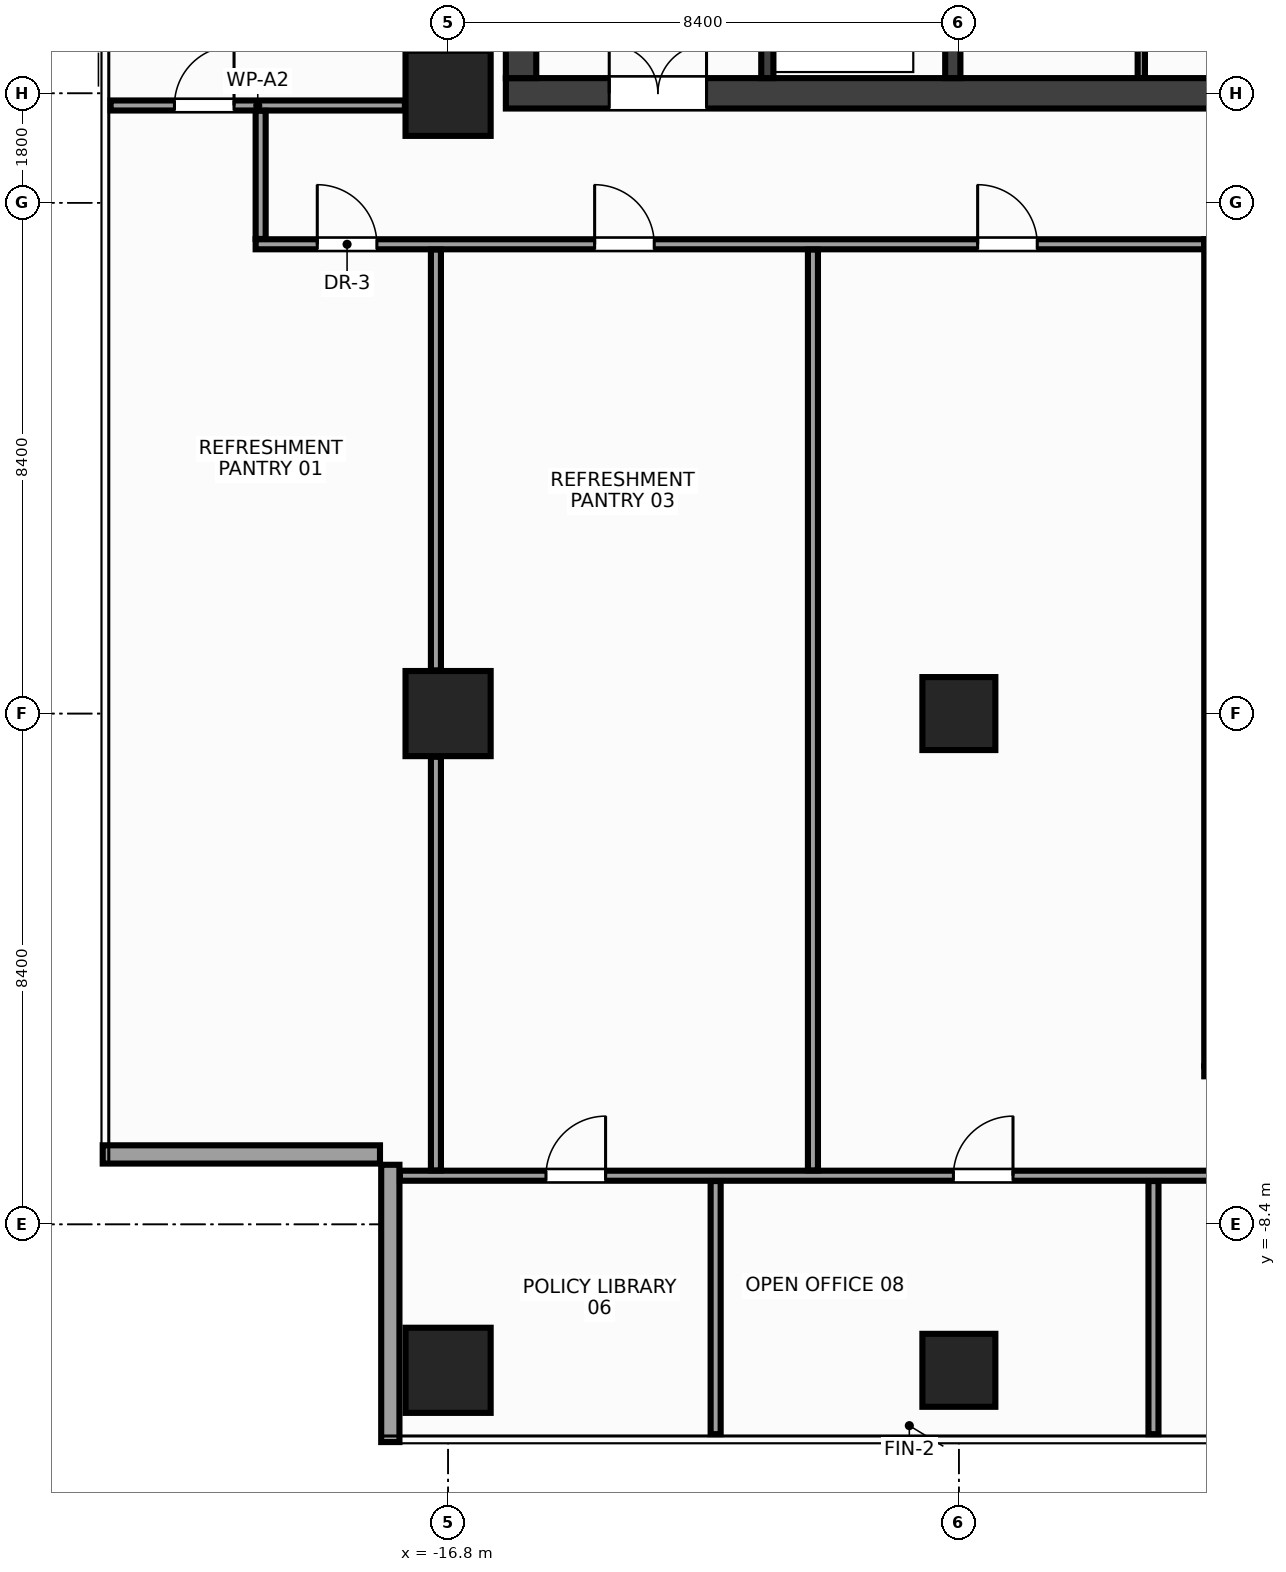
"""IFC4 building model, lengths in metres.
Left out: names, types, materials, properties, quantities, classifications, styles, units other than length and angle.
Written with IfcOpenShell. Run it as: python <this file> out.ifc"""

import sys

from ifc_helpers import new_model, si_unit, direction, frame, frame_2d, origin, origin_2d, place, context, subcontext, project, spatial, rectangle, extrude, source, transform, mapped, element, fill, save


model = new_model("IFC4")
c1 = context("Model", 3, precision=1e-05, world=origin(), true_north=direction((0.0, 1.0)))
c2 = subcontext(c1, "Body", "Model", "MODEL_VIEW")
j1 = project(units=[si_unit("LENGTHUNIT", "METRE"), si_unit("PLANEANGLEUNIT", "RADIAN")], contexts=[c1])
p1 = place(None, origin())
s1 = spatial("IfcSite", under=j1, at=p1, CompositionType="ELEMENT")
p2 = place(p1, origin())
s2 = spatial("IfcBuilding", under=s1, at=p2, CompositionType="ELEMENT")
p3 = place(p2, frame((0.0, 0.0, 257.6)))
s3 = spatial("IfcBuildingStorey", under=s2, at=p3, CompositionType="ELEMENT", Elevation=257.6)
m1 = source(origin(), c2, "Body", "SweptSolid", [
    extrude(rectangle(XDim=31.7, YDim=0.5, at=frame_2d((15.85, 0.0))), origin(), (0.0, 0.0, 1.0), 3.6),
])
p4 = place(p3, frame((-15.85, 10.2, 0.0), z_axis=(0.0, 0.0, 1.0), x_axis=(1.0, 0.0, 0.0)))
e1 = element("IfcWall", 1, at=p4, inside=s3, PredefinedType="SHEAR", context=c2, shape_type="MappedRepresentation", body=[
    mapped(m1, transform((0.0, 0.0, 0.0), x_axis=(1.0, 0.0, 0.0), y_axis=(0.0, 1.0, 0.0), z_axis=(0.0, 0.0, 1.0), scale=1.0)),
])
p5 = place(p4, frame((1.7, 0.0, 0.0)))
e2 = element("IfcOpeningElement", 2, at=p5, cuts=e1, PredefinedType="OPENING", context=c2, shape_type="SweptSolid", body=[
    extrude(rectangle(XDim=1.6, YDim=2.15, at=frame_2d((0.8, 1.075))), frame((0.0, 0.262, 0.0), z_axis=(0.0, -1.0, 0.0), x_axis=(1.0, 0.0, 0.0)), (0.0, 0.0, 1.0), 0.524),
])
p6 = place(p4, frame((28.4, 0.0, 0.0)))
e3 = element("IfcOpeningElement", 3, at=p6, cuts=e1, PredefinedType="OPENING", context=c2, shape_type="SweptSolid", body=[
    extrude(rectangle(XDim=1.6, YDim=2.15, at=frame_2d((0.8, 1.075))), frame((0.0, 0.262, 0.0), z_axis=(0.0, -1.0, 0.0), x_axis=(1.0, 0.0, 0.0)), (0.0, 0.0, 1.0), 0.524),
])
p7 = place(p4, frame((15.1, 0.0, 0.0)))
e4 = element("IfcOpeningElement", 4, at=p7, cuts=e1, PredefinedType="OPENING", context=c2, shape_type="SweptSolid", body=[
    extrude(rectangle(XDim=1.5, YDim=2.2, at=frame_2d((0.75, 1.1))), frame((0.0, 0.262, 0.0), z_axis=(0.0, -1.0, 0.0), x_axis=(1.0, 0.0, 0.0)), (0.0, 0.0, 1.0), 0.524),
])
m2 = source(origin(), c2, "Body", "SweptSolid", [
    extrude(rectangle(XDim=13.1, YDim=0.5, at=frame_2d((6.55, 0.0))), origin(), (0.0, 0.0, 1.0), 3.6),
])
p8 = place(p3, frame((-15.6, 10.45, 0.0), z_axis=(0.0, 0.0, 1.0), x_axis=(0.0, 1.0, 0.0)))
e5 = element("IfcWall", 5, at=p8, inside=s3, PredefinedType="SHEAR", context=c2, shape_type="MappedRepresentation", body=[
    mapped(m2, transform((0.0, 0.0, 0.0), x_axis=(1.0, 0.0, 0.0), y_axis=(0.0, 1.0, 0.0), z_axis=(0.0, 0.0, 1.0), scale=1.0)),
])
m3 = source(origin(), c2, "Body", "SweptSolid", [
    extrude(rectangle(XDim=13.1, YDim=0.25, at=frame_2d((6.55, 0.0))), origin(), (0.0, 0.0, 1.0), 3.6),
])
p9 = place(p3, frame((-8.5, 10.45, 0.0), z_axis=(0.0, 0.0, 1.0), x_axis=(0.0, 1.0, 0.0)))
e6 = element("IfcWall", 6, at=p9, inside=s3, PredefinedType="SHEAR", context=c2, shape_type="MappedRepresentation", body=[
    mapped(m3, transform((0.0, 0.0, 0.0), x_axis=(1.0, 0.0, 0.0), y_axis=(0.0, 1.0, 0.0), z_axis=(0.0, 0.0, 1.0), scale=1.0)),
])
p10 = place(p9, frame((4.22, 0.0, 0.0)))
e7 = element("IfcOpeningElement", 7, at=p10, cuts=e6, PredefinedType="OPENING", context=c2, shape_type="SweptSolid", body=[
    extrude(rectangle(XDim=1.1, YDim=2.15, at=frame_2d((0.55, 1.075))), frame((0.0, 0.137, 0.0), z_axis=(0.0, -1.0, 0.0), x_axis=(1.0, 0.0, 0.0)), (0.0, 0.0, 1.0), 0.274),
])
p11 = place(p9, frame((6.14, 0.0, 0.0)))
e8 = element("IfcOpeningElement", 8, at=p11, cuts=e6, PredefinedType="OPENING", context=c2, shape_type="SweptSolid", body=[
    extrude(rectangle(XDim=1.1, YDim=2.15, at=frame_2d((0.55, 1.075))), frame((0.0, 0.137, 0.0), z_axis=(0.0, -1.0, 0.0), x_axis=(1.0, 0.0, 0.0)), (0.0, 0.0, 1.0), 0.274),
])
p12 = place(p9, frame((8.06, 0.0, 0.0)))
e9 = element("IfcOpeningElement", 9, at=p12, cuts=e6, PredefinedType="OPENING", context=c2, shape_type="SweptSolid", body=[
    extrude(rectangle(XDim=1.1, YDim=2.15, at=frame_2d((0.55, 1.075))), frame((0.0, 0.137, 0.0), z_axis=(0.0, -1.0, 0.0), x_axis=(1.0, 0.0, 0.0)), (0.0, 0.0, 1.0), 0.274),
])
m4 = source(origin(), c2, "Body", "SweptSolid", [
    extrude(rectangle(XDim=3.2, YDim=0.2, at=frame_2d((1.6, 0.0))), origin(), (0.0, 0.0, 1.0), 3.6),
])
p13 = place(p3, frame((-11.55, 10.45, 0.0), z_axis=(0.0, 0.0, 1.0), x_axis=(0.0, 1.0, 0.0)))
e10 = element("IfcWall", 10, at=p13, inside=s3, PredefinedType="SHEAR", context=c2, shape_type="MappedRepresentation", body=[
    mapped(m4, transform((0.0, 0.0, 0.0), x_axis=(1.0, 0.0, 0.0), y_axis=(0.0, 1.0, 0.0), z_axis=(0.0, 0.0, 1.0), scale=1.0)),
])
p14 = place(p13, frame((0.9, 0.0, 0.0)))
e11 = element("IfcOpeningElement", 11, at=p14, cuts=e10, PredefinedType="OPENING", context=c2, shape_type="SweptSolid", body=[
    extrude(rectangle(XDim=1.1, YDim=2.15, at=frame_2d((0.55, 1.075))), frame((0.0, 0.112, 0.0), z_axis=(0.0, -1.0, 0.0), x_axis=(1.0, 0.0, 0.0)), (0.0, 0.0, 1.0), 0.224),
])
m5 = source(origin(), c2, "Body", "SweptSolid", [
    extrude(rectangle(XDim=1.4, YDim=1.4, at=origin_2d()), origin(), (0.0, 0.0, 1.0), 3.6),
])
for number, where, z_axis, x_axis in (
    (12, (-16.8, -10.8, 0.0), (0.0, 0.0, 1.0), (1.0, 0.0, 0.0)),
    (13, (-16.8, 0.0, 0.0), (0.0, 0.0, 1.0), (1.0, 0.0, 0.0)),
    (14, (-16.8, 10.2, 0.0), (0.0, 0.0, 1.0), (1.0, 0.0, 0.0)),
):
    element("IfcColumn", number, at=place(p3, frame(where, z_axis=z_axis, x_axis=x_axis)), inside=s3, PredefinedType="COLUMN", context=c2, shape_type="MappedRepresentation", body=[
        mapped(m5, transform((0.0, 0.0, 0.0), x_axis=(1.0, 0.0, 0.0), y_axis=(0.0, 1.0, 0.0), z_axis=(0.0, 0.0, 1.0), scale=1.0)),
    ])
m6 = source(origin(), c2, "Body", "SweptSolid", [
    extrude(rectangle(XDim=1.2, YDim=1.2, at=origin_2d()), origin(), (0.0, 0.0, 1.0), 3.6),
])
for number, where, z_axis, x_axis in (
    (15, (-8.4, 0.0, 0.0), (0.0, 0.0, 1.0), (1.0, 0.0, 0.0)),
    (16, (-8.4, -10.8, 0.0), (0.0, 0.0, 1.0), (1.0, 0.0, 0.0)),
):
    element("IfcColumn", number, at=place(p3, frame(where, z_axis=z_axis, x_axis=x_axis)), inside=s3, PredefinedType="COLUMN", context=c2, shape_type="MappedRepresentation", body=[
        mapped(m6, transform((0.0, 0.0, 0.0), x_axis=(1.0, 0.0, 0.0), y_axis=(0.0, 1.0, 0.0), z_axis=(0.0, 0.0, 1.0), scale=1.0)),
    ])
m7 = source(origin(), c2, "Body", "SweptSolid", [
    extrude(rectangle(XDim=4.56, YDim=0.3, at=frame_2d((2.28, 0.0))), origin(), (0.0, 0.0, 1.0), 2.75),
])
for number, where, z_axis, x_axis in (
    (17, (-22.48, -7.25, 0.0), (0.0, 0.0, 1.0), (1.0, 0.0, 0.0)),
    (18, (-17.75, -7.42, 0.0), (0.0, 0.0, 1.0), (0.0, -1.0, 0.0)),
):
    element("IfcWall", number, at=place(p3, frame(where, z_axis=z_axis, x_axis=x_axis)), inside=s3, PredefinedType="STANDARD", context=c2, shape_type="MappedRepresentation", body=[
        mapped(m7, transform((0.0, 0.0, 0.0), x_axis=(1.0, 0.0, 0.0), y_axis=(0.0, 1.0, 0.0), z_axis=(0.0, 0.0, 1.0), scale=1.0)),
    ])
m8 = source(origin(), c2, "Body", "SweptSolid", [
    extrude(rectangle(XDim=3.49, YDim=0.12, at=frame_2d((1.745, 0.0))), origin(), (0.0, 0.0, 1.0), 3.37),
])
p15 = place(p3, frame((-5.4, 10.45, 0.0), z_axis=(0.0, 0.0, 1.0), x_axis=(0.0, 1.0, 0.0)))
e19 = element("IfcWall", 19, at=p15, inside=s3, PredefinedType="PARTITIONING", context=c2, shape_type="MappedRepresentation", body=[
    mapped(m8, transform((0.0, 0.0, 0.0), x_axis=(1.0, 0.0, 0.0), y_axis=(0.0, 1.0, 0.0), z_axis=(0.0, 0.0, 1.0), scale=1.0)),
])
m9 = source(origin(), c2, "Body", "SweptSolid", [
    extrude(rectangle(XDim=4.84, YDim=0.165, at=frame_2d((2.42, 0.0))), origin(), (0.0, 0.0, 1.0), 3.37),
])
p16 = place(p3, frame((-22.35, 10.0, 0.0), z_axis=(0.0, 0.0, 1.0), x_axis=(1.0, 0.0, 0.0)))
e20 = element("IfcWall", 20, at=p16, inside=s3, PredefinedType="PARTITIONING", context=c2, shape_type="MappedRepresentation", body=[
    mapped(m9, transform((0.0, 0.0, 0.0), x_axis=(1.0, 0.0, 0.0), y_axis=(0.0, 1.0, 0.0), z_axis=(0.0, 0.0, 1.0), scale=1.0)),
])
p17 = place(p16, frame((1.05, 0.0, 0.0)))
e21 = element("IfcOpeningElement", 21, at=p17, cuts=e20, PredefinedType="OPENING", context=c2, shape_type="SweptSolid", body=[
    extrude(rectangle(XDim=0.98, YDim=2.15, at=frame_2d((0.49, 1.075))), frame((0.0, 0.094, 0.0), z_axis=(0.0, -1.0, 0.0), x_axis=(1.0, 0.0, 0.0)), (0.0, 0.0, 1.0), 0.189),
])
m10 = source(origin(), c2, "Body", "SweptSolid", [
    extrude(rectangle(XDim=15.6, YDim=0.165, at=frame_2d((7.8, 0.0))), origin(), (0.0, 0.0, 1.0), 2.755),
])
p18 = place(p3, frame((-19.965, 7.718, 0.0), z_axis=(0.0, 0.0, 1.0), x_axis=(1.0, 0.0, 0.0)))
e22 = element("IfcWall", 22, at=p18, inside=s3, PredefinedType="PARTITIONING", context=c2, shape_type="MappedRepresentation", body=[
    mapped(m10, transform((0.0, 0.0, 0.0), x_axis=(1.0, 0.0, 0.0), y_axis=(0.0, 1.0, 0.0), z_axis=(0.0, 0.0, 1.0), scale=1.0)),
])
p19 = place(p18, frame((1.014, 0.0, 0.0)))
e23 = element("IfcOpeningElement", 23, at=p19, cuts=e22, PredefinedType="OPENING", context=c2, shape_type="SweptSolid", body=[
    extrude(rectangle(XDim=0.98, YDim=2.15, at=frame_2d((0.49, 1.075))), frame((0.0, 0.094, 0.0), z_axis=(0.0, -1.0, 0.0), x_axis=(1.0, 0.0, 0.0)), (0.0, 0.0, 1.0), 0.189),
])
p20 = place(p18, frame((5.575, 0.0, 0.0)))
e24 = element("IfcOpeningElement", 24, at=p20, cuts=e22, PredefinedType="OPENING", context=c2, shape_type="SweptSolid", body=[
    extrude(rectangle(XDim=0.98, YDim=2.15, at=frame_2d((0.49, 1.075))), frame((0.0, 0.094, 0.0), z_axis=(0.0, -1.0, 0.0), x_axis=(1.0, 0.0, 0.0)), (0.0, 0.0, 1.0), 0.189),
])
p21 = place(p18, frame((11.874, 0.0, 0.0)))
e25 = element("IfcOpeningElement", 25, at=p21, cuts=e22, PredefinedType="OPENING", context=c2, shape_type="SweptSolid", body=[
    extrude(rectangle(XDim=0.98, YDim=2.15, at=frame_2d((0.49, 1.075))), frame((0.0, 0.094, 0.0), z_axis=(0.0, -1.0, 0.0), x_axis=(1.0, 0.0, 0.0)), (0.0, 0.0, 1.0), 0.189),
])
m11 = source(origin(), c2, "Body", "SweptSolid", [
    extrude(rectangle(XDim=2.43, YDim=0.165, at=frame_2d((1.215, 0.0))), origin(), (0.0, 0.0, 1.0), 3.37),
])
p22 = place(p3, frame((-4.365, -5.883, 0.0), z_axis=(0.0, 0.0, 1.0), x_axis=(1.0, 0.0, 0.0)))
e26 = element("IfcWall", 26, at=p22, inside=s3, PredefinedType="PARTITIONING", context=c2, shape_type="MappedRepresentation", body=[
    mapped(m11, transform((0.0, 0.0, 0.0), x_axis=(1.0, 0.0, 0.0), y_axis=(0.0, 1.0, 0.0), z_axis=(0.0, 0.0, 1.0), scale=1.0)),
])
m12 = source(origin(), c2, "Body", "SweptSolid", [
    extrude(rectangle(XDim=2.108, YDim=0.165, at=frame_2d((1.054, 0.0))), origin(), (0.0, 0.0, 1.0), 3.37),
])
p23 = place(p3, frame((-19.883, 7.805, 0.0), z_axis=(0.0, 0.0, 1.0), x_axis=(0.0, 1.0, 0.0)))
e27 = element("IfcWall", 27, at=p23, inside=s3, PredefinedType="PARTITIONING", context=c2, shape_type="MappedRepresentation", body=[
    mapped(m12, transform((0.0, 0.0, 0.0), x_axis=(1.0, 0.0, 0.0), y_axis=(0.0, 1.0, 0.0), z_axis=(0.0, 0.0, 1.0), scale=1.0)),
])
m13 = source(origin(), c2, "Body", "SweptSolid", [
    extrude(rectangle(XDim=13.595, YDim=0.165, at=frame_2d((6.797, 0.0))), origin(), (0.0, 0.0, 1.0), 2.655),
])
p24 = place(p3, frame((-4.282, -5.795, 0.0), z_axis=(0.0, 0.0, 1.0), x_axis=(0.0, 1.0, 0.0)))
e28 = element("IfcWall", 28, at=p24, inside=s3, PredefinedType="PARTITIONING", context=c2, shape_type="MappedRepresentation", body=[
    mapped(m13, transform((0.0, 0.0, 0.0), x_axis=(1.0, 0.0, 0.0), y_axis=(0.0, 1.0, 0.0), z_axis=(0.0, 0.0, 1.0), scale=1.0)),
])
m14 = source(origin(), c2, "Body", "SweptSolid", [
    extrude(rectangle(XDim=35.184, YDim=0.165, at=frame_2d((17.592, 0.0))), origin(), (0.0, 0.0, 1.0), 2.755),
])
p25 = place(p3, frame((-17.592, -7.6, 0.0), z_axis=(0.0, 0.0, 1.0), x_axis=(1.0, 0.0, 0.0)))
e29 = element("IfcWall", 29, at=p25, inside=s3, PredefinedType="PARTITIONING", context=c2, shape_type="MappedRepresentation", body=[
    mapped(m14, transform((0.0, 0.0, 0.0), x_axis=(1.0, 0.0, 0.0), y_axis=(0.0, 1.0, 0.0), z_axis=(0.0, 0.0, 1.0), scale=1.0)),
])
p26 = place(p25, frame((2.402, 0.0, 0.0)))
e30 = element("IfcOpeningElement", 30, at=p26, cuts=e29, PredefinedType="OPENING", context=c2, shape_type="SweptSolid", body=[
    extrude(rectangle(XDim=0.98, YDim=2.15, at=frame_2d((0.49, 1.075))), frame((0.0, 0.094, 0.0), z_axis=(0.0, -1.0, 0.0), x_axis=(1.0, 0.0, 0.0)), (0.0, 0.0, 1.0), 0.189),
])
p27 = place(p25, frame((31.702, 0.0, 0.0)))
e31 = element("IfcOpeningElement", 31, at=p27, cuts=e29, PredefinedType="OPENING", context=c2, shape_type="SweptSolid", body=[
    extrude(rectangle(XDim=0.98, YDim=2.15, at=frame_2d((0.49, 1.075))), frame((0.0, 0.094, 0.0), z_axis=(0.0, -1.0, 0.0), x_axis=(1.0, 0.0, 0.0)), (0.0, 0.0, 1.0), 0.189),
])
p28 = place(p25, frame((9.102, 0.0, 0.0)))
e32 = element("IfcOpeningElement", 32, at=p28, cuts=e29, PredefinedType="OPENING", context=c2, shape_type="SweptSolid", body=[
    extrude(rectangle(XDim=0.98, YDim=2.15, at=frame_2d((0.49, 1.075))), frame((0.0, 0.094, 0.0), z_axis=(0.0, -1.0, 0.0), x_axis=(1.0, 0.0, 0.0)), (0.0, 0.0, 1.0), 0.189),
])
p29 = place(p25, frame((16.302, 0.0, 0.0)))
e33 = element("IfcOpeningElement", 33, at=p29, cuts=e29, PredefinedType="OPENING", context=c2, shape_type="SweptSolid", body=[
    extrude(rectangle(XDim=0.98, YDim=2.15, at=frame_2d((0.49, 1.075))), frame((0.0, 0.094, 0.0), z_axis=(0.0, -1.0, 0.0), x_axis=(1.0, 0.0, 0.0)), (0.0, 0.0, 1.0), 0.189),
])
p30 = place(p25, frame((24.302, 0.0, 0.0)))
e34 = element("IfcOpeningElement", 34, at=p30, cuts=e29, PredefinedType="OPENING", context=c2, shape_type="SweptSolid", body=[
    extrude(rectangle(XDim=0.98, YDim=2.15, at=frame_2d((0.49, 1.075))), frame((0.0, 0.094, 0.0), z_axis=(0.0, -1.0, 0.0), x_axis=(1.0, 0.0, 0.0)), (0.0, 0.0, 1.0), 0.189),
])
m15 = source(origin(), c2, "Body", "SweptSolid", [
    extrude(rectangle(XDim=6.802, YDim=0.165, at=frame_2d((3.401, 0.0))), origin(), (0.0, 0.0, 1.0), 2.755),
])
p31 = place(p3, frame((-17.0, -7.512, 0.0), z_axis=(0.0, 0.0, 1.0), x_axis=(0.0, 1.0, 0.0)))
e35 = element("IfcWall", 35, at=p31, inside=s3, PredefinedType="PARTITIONING", context=c2, shape_type="MappedRepresentation", body=[
    mapped(m15, transform((0.0, 0.0, 0.0), x_axis=(1.0, 0.0, 0.0), y_axis=(0.0, 1.0, 0.0), z_axis=(0.0, 0.0, 1.0), scale=1.0)),
])
m16 = source(origin(), c2, "Body", "SweptSolid", [
    extrude(rectangle(XDim=6.92, YDim=0.165, at=frame_2d((3.46, 0.0))), origin(), (0.0, 0.0, 1.0), 2.755),
])
p32 = place(p3, frame((-17.0, 0.71, 0.0), z_axis=(0.0, 0.0, 1.0), x_axis=(0.0, 1.0, 0.0)))
e36 = element("IfcWall", 36, at=p32, inside=s3, PredefinedType="PARTITIONING", context=c2, shape_type="MappedRepresentation", body=[
    mapped(m16, transform((0.0, 0.0, 0.0), x_axis=(1.0, 0.0, 0.0), y_axis=(0.0, 1.0, 0.0), z_axis=(0.0, 0.0, 1.0), scale=1.0)),
])
m17 = source(origin(), c2, "Body", "SweptSolid", [
    extrude(rectangle(XDim=15.142, YDim=0.165, at=frame_2d((7.571, 0.0))), origin(), (0.0, 0.0, 1.0), 2.655),
])
p33 = place(p3, frame((-10.8, -7.512, 0.0), z_axis=(0.0, 0.0, 1.0), x_axis=(0.0, 1.0, 0.0)))
e37 = element("IfcWall", 37, at=p33, inside=s3, PredefinedType="PARTITIONING", context=c2, shape_type="MappedRepresentation", body=[
    mapped(m17, transform((0.0, 0.0, 0.0), x_axis=(1.0, 0.0, 0.0), y_axis=(0.0, 1.0, 0.0), z_axis=(0.0, 0.0, 1.0), scale=1.0)),
])
m18 = source(origin(), c2, "Body", "SweptSolid", [
    extrude(rectangle(XDim=4.163, YDim=0.165, at=frame_2d((2.081, 0.0))), origin(), (0.0, 0.0, 1.0), 2.905),
])
for number, where, z_axis, x_axis in (
    (38, (-12.4, -11.85, 0.0), (0.0, 0.0, 1.0), (0.0, 1.0, 0.0)),
    (39, (-5.2, -11.85, 0.0), (0.0, 0.0, 1.0), (0.0, 1.0, 0.0)),
):
    element("IfcWall", number, at=place(p3, frame(where, z_axis=z_axis, x_axis=x_axis)), inside=s3, PredefinedType="PARTITIONING", context=c2, shape_type="MappedRepresentation", body=[
        mapped(m18, transform((0.0, 0.0, 0.0), x_axis=(1.0, 0.0, 0.0), y_axis=(0.0, 1.0, 0.0), z_axis=(0.0, 0.0, 1.0), scale=1.0)),
    ])
m19 = source(origin(), c2, "Body", "SweptSolid", [
    extrude(rectangle(XDim=1.6, YDim=2.15, at=frame_2d((0.8, 1.075))), frame((0.0, 0.025, 0.0), z_axis=(0.0, -1.0, 0.0), x_axis=(1.0, 0.0, 0.0)), (0.0, 0.0, 1.0), 0.05),
])
p34 = place(p5, origin())
e40 = element("IfcDoor", 40, at=p34, inside=s3, OperationType="DOUBLE_DOOR_SINGLE_SWING", PredefinedType="DOOR", context=c2, shape_type="MappedRepresentation", body=[
    mapped(m19, transform((0.0, 0.0, 0.0), x_axis=(1.0, 0.0, 0.0), y_axis=(0.0, 1.0, 0.0), z_axis=(0.0, 0.0, 1.0), scale=1.0)),
])
fill(e2, e40)
m20 = source(origin(), c2, "Body", "SweptSolid", [
    extrude(rectangle(XDim=0.98, YDim=2.15, at=frame_2d((0.49, 1.075))), frame((0.0, 0.025, 0.0), z_axis=(0.0, -1.0, 0.0), x_axis=(1.0, 0.0, 0.0)), (0.0, 0.0, 1.0), 0.05),
])
p35 = place(p19, origin())
e41 = element("IfcDoor", 41, at=p35, inside=s3, OperationType="SINGLE_SWING_LEFT", PredefinedType="DOOR", context=c2, shape_type="MappedRepresentation", body=[
    mapped(m20, transform((0.0, 0.0, 0.0), x_axis=(1.0, 0.0, 0.0), y_axis=(0.0, 1.0, 0.0), z_axis=(0.0, 0.0, 1.0), scale=1.0)),
])
fill(e23, e41)
p36 = place(p20, origin())
e42 = element("IfcDoor", 42, at=p36, inside=s3, OperationType="SINGLE_SWING_LEFT", PredefinedType="DOOR", context=c2, shape_type="MappedRepresentation", body=[
    mapped(m20, transform((0.0, 0.0, 0.0), x_axis=(1.0, 0.0, 0.0), y_axis=(0.0, 1.0, 0.0), z_axis=(0.0, 0.0, 1.0), scale=1.0)),
])
fill(e24, e42)
p37 = place(p21, origin())
e43 = element("IfcDoor", 43, at=p37, inside=s3, OperationType="SINGLE_SWING_LEFT", PredefinedType="DOOR", context=c2, shape_type="MappedRepresentation", body=[
    mapped(m20, transform((0.0, 0.0, 0.0), x_axis=(1.0, 0.0, 0.0), y_axis=(0.0, 1.0, 0.0), z_axis=(0.0, 0.0, 1.0), scale=1.0)),
])
fill(e25, e43)
p38 = place(p17, origin())
e44 = element("IfcDoor", 44, at=p38, inside=s3, OperationType="SINGLE_SWING_RIGHT", PredefinedType="DOOR", context=c2, shape_type="MappedRepresentation", body=[
    mapped(m20, transform((0.0, 0.0, 0.0), x_axis=(1.0, 0.0, 0.0), y_axis=(0.0, 1.0, 0.0), z_axis=(0.0, 0.0, 1.0), scale=1.0)),
])
fill(e21, e44)
p39 = place(p26, origin())
e45 = element("IfcDoor", 45, at=p39, inside=s3, OperationType="SINGLE_SWING_RIGHT", PredefinedType="DOOR", context=c2, shape_type="MappedRepresentation", body=[
    mapped(m20, transform((0.0, 0.0, 0.0), x_axis=(1.0, 0.0, 0.0), y_axis=(0.0, 1.0, 0.0), z_axis=(0.0, 0.0, 1.0), scale=1.0)),
])
fill(e30, e45)
p40 = place(p28, origin())
e46 = element("IfcDoor", 46, at=p40, inside=s3, OperationType="SINGLE_SWING_RIGHT", PredefinedType="DOOR", context=c2, shape_type="MappedRepresentation", body=[
    mapped(m20, transform((0.0, 0.0, 0.0), x_axis=(1.0, 0.0, 0.0), y_axis=(0.0, 1.0, 0.0), z_axis=(0.0, 0.0, 1.0), scale=1.0)),
])
fill(e32, e46)
save(model, sys.argv[1])
